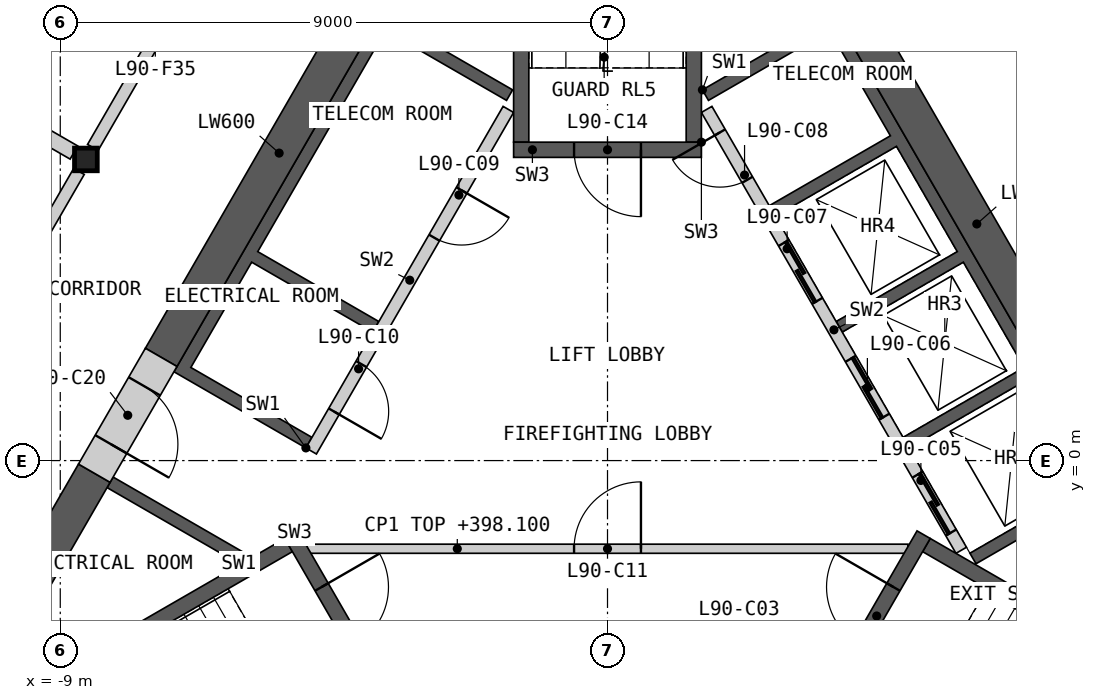
"""IFC4 building model, lengths in metres.
Left out: names, types, materials, properties, quantities, classifications, styles, units other than length and angle.
Written with IfcOpenShell. Run it as: python <this file> out.ifc"""

import sys

from ifc_helpers import new_model, si_unit, direction, frame, frame_2d, origin, origin_2d, place, context, subcontext, project, spatial, polyline, rectangle, i_section, outline, extrude, element, fill, save


model = new_model("IFC4")
c1 = context("Model", 3, precision=1e-05, world=origin(), true_north=direction((0.0, 1.0)))
c2 = subcontext(c1, "Body", "Model", "MODEL_VIEW")
j1 = project(units=[si_unit("LENGTHUNIT", "METRE"), si_unit("PLANEANGLEUNIT", "RADIAN")], contexts=[c1])
p1 = place(None, origin())
s1 = spatial("IfcSite", under=j1, at=p1, CompositionType="ELEMENT")
p2 = place(p1, origin())
s2 = spatial("IfcBuilding", under=s1, at=p2, CompositionType="ELEMENT")
p3 = place(p2, frame((0.0, 0.0, 395.0)))
s3 = spatial("IfcBuildingStorey", under=s2, at=p3, CompositionType="ELEMENT", Elevation=395.0)
p4 = place(p3, frame((-8.578, 4.953, 0.0), z_axis=(0.0, 0.0, 1.0), x_axis=(1.0, 0.0, 0.0)))
e1 = element("IfcColumn", 1, at=p4, inside=s3, PredefinedType="COLUMN", context=c2, shape_type="SweptSolid", body=[
    extrude(i_section(OverallWidth=0.374, OverallDepth=0.372, WebThickness=0.016, FlangeThickness=0.026, at=origin_2d()), origin(), (0.0, 0.0, 1.0), 3.4),
])
p5 = place(p3, origin())
e2 = element("IfcWall", 2, at=p5, inside=s3, PredefinedType="SHEAR", context=c2, shape_type="SweptSolid", body=[
    extrude(outline(polyline([(1.561, 6.097), (3.731, 7.35), (8.231, -0.444), (6.061, -1.697), (5.96, -1.524), (7.952, -0.374), (6.952, 1.358), (4.96, 0.208), (4.861, 0.381), (6.852, 1.531), (5.852, 3.263), (3.861, 2.113), (3.76, 2.287), (5.752, 3.437), (4.752, 5.169), (2.76, 4.019), (2.66, 4.192), (4.652, 5.342), (3.652, 7.074), (1.66, 5.924), (1.561, 6.097)])), origin(), (0.0, 0.0, 1.0), 3.1),
])
p6 = place(p3, frame((5.817, -1.476, 0.0), z_axis=(0.0, 0.0, 1.0), x_axis=(-0.500002616675, 0.866023893041, 0.0)))
e3 = element("IfcWall", 3, at=p6, inside=s3, PredefinedType="SOLIDWALL", context=c2, shape_type="SweptSolid", body=[
    extrude(rectangle(XDim=8.373, YDim=0.2, at=frame_2d((4.187, 0.0))), origin(), (0.0, 0.0, 1.0), 3.1),
])
p7 = place(p6, frame((0.337, 0.0, 0.0)))
e4 = element("IfcOpeningElement", 4, at=p7, cuts=e3, PredefinedType="OPENING", context=c2, shape_type="SweptSolid", body=[
    extrude(rectangle(XDim=1.1, YDim=2.1, at=frame_2d((0.55, 1.05))), frame((0.0, 0.11, 0.0), z_axis=(0.0, -1.0, 0.0), x_axis=(1.0, 0.0, 0.0)), (0.0, 0.0, 1.0), 0.22),
])
p8 = place(p6, frame((2.537, 0.0, 0.0)))
e5 = element("IfcOpeningElement", 5, at=p8, cuts=e3, PredefinedType="OPENING", context=c2, shape_type="SweptSolid", body=[
    extrude(rectangle(XDim=1.1, YDim=2.1, at=frame_2d((0.55, 1.05))), frame((0.0, 0.11, 0.0), z_axis=(0.0, -1.0, 0.0), x_axis=(1.0, 0.0, 0.0)), (0.0, 0.0, 1.0), 0.22),
])
p9 = place(p6, frame((4.737, 0.0, 0.0)))
e6 = element("IfcOpeningElement", 6, at=p9, cuts=e3, PredefinedType="OPENING", context=c2, shape_type="SweptSolid", body=[
    extrude(rectangle(XDim=1.1, YDim=2.1, at=frame_2d((0.55, 1.05))), frame((0.0, 0.11, 0.0), z_axis=(0.0, -1.0, 0.0), x_axis=(1.0, 0.0, 0.0)), (0.0, 0.0, 1.0), 0.22),
])
p10 = place(p6, frame((7.037, 0.0, 0.0)))
e7 = element("IfcOpeningElement", 7, at=p10, cuts=e3, PredefinedType="OPENING", context=c2, shape_type="SweptSolid", body=[
    extrude(rectangle(XDim=0.9, YDim=2.1, at=frame_2d((0.45, 1.05))), frame((0.0, 0.11, 0.0), z_axis=(0.0, -1.0, 0.0), x_axis=(1.0, 0.0, 0.0)), (0.0, 0.0, 1.0), 0.22),
])
p11 = place(p3, origin())
e8 = element("IfcWall", 8, at=p11, inside=s3, PredefinedType="SHEAR", context=c2, shape_type="SweptSolid", body=[
    extrude(outline(polyline([(-6.061, -1.697), (-8.231, -0.444), (-8.131, -0.271), (-5.96, -1.524), (-6.061, -1.697)])), origin(), (0.0, 0.0, 1.0), 3.1),
])
p12 = place(p3, origin())
e9 = element("IfcWall", 9, at=p12, inside=s3, PredefinedType="SHEAR", context=c2, shape_type="SweptSolid", body=[
    extrude(outline(polyline([(-4.96, 0.208), (-7.131, 1.461), (-3.731, 7.35), (-1.561, 6.097), (-1.66, 5.924), (-3.652, 7.074), (-5.752, 3.437), (-3.76, 2.287), (-3.861, 2.113), (-5.852, 3.263), (-6.852, 1.531), (-4.861, 0.381), (-4.96, 0.208)])), origin(), (0.0, 0.0, 1.0), 3.1),
])
p13 = place(p3, frame((-1.631, 5.776, 0.0), z_axis=(0.0, 0.0, 1.0), x_axis=(-0.499992876559, -0.866029516466, 0.0)))
e10 = element("IfcWall", 10, at=p13, inside=s3, PredefinedType="SOLIDWALL", context=c2, shape_type="SweptSolid", body=[
    extrude(rectangle(XDim=6.486, YDim=0.2, at=frame_2d((3.243, 0.0))), origin(), (0.0, 0.0, 1.0), 3.1),
])
p14 = place(p13, frame((1.537, 0.0, 0.0)))
e11 = element("IfcOpeningElement", 11, at=p14, cuts=e10, PredefinedType="OPENING", context=c2, shape_type="SweptSolid", body=[
    extrude(rectangle(XDim=0.9, YDim=2.1, at=frame_2d((0.45, 1.05))), frame((0.0, 0.11, 0.0), z_axis=(0.0, -1.0, 0.0), x_axis=(1.0, 0.0, 0.0)), (0.0, 0.0, 1.0), 0.22),
])
p15 = place(p13, frame((4.837, 0.0, 0.0)))
e12 = element("IfcOpeningElement", 12, at=p15, cuts=e10, PredefinedType="OPENING", context=c2, shape_type="SweptSolid", body=[
    extrude(rectangle(XDim=0.9, YDim=2.1, at=frame_2d((0.45, 1.05))), frame((0.0, 0.11, 0.0), z_axis=(0.0, -1.0, 0.0), x_axis=(1.0, 0.0, 0.0)), (0.0, 0.0, 1.0), 0.22),
])
p16 = place(p3, frame((-4.941, -1.45, 0.0), z_axis=(0.0, 0.0, 1.0), x_axis=(1.0, 0.0, 0.0)))
e13 = element("IfcWall", 13, at=p16, inside=s3, PredefinedType="PARTITIONING", context=c2, shape_type="SweptSolid", body=[
    extrude(rectangle(XDim=9.882, YDim=0.15, at=frame_2d((4.941, 0.0))), origin(), (0.0, 0.0, 1.0), 3.1),
])
p17 = place(p16, frame((4.391, 0.0, 0.0)))
e14 = element("IfcOpeningElement", 14, at=p17, cuts=e13, PredefinedType="OPENING", context=c2, shape_type="SweptSolid", body=[
    extrude(rectangle(XDim=1.1, YDim=2.1, at=frame_2d((0.55, 1.05))), frame((0.0, 0.085, 0.0), z_axis=(0.0, -1.0, 0.0), x_axis=(1.0, 0.0, 0.0)), (0.0, 0.0, 1.0), 0.17),
])
p18 = place(p3, origin())
e15 = element("IfcWall", 15, at=p18, inside=s3, PredefinedType="SHEAR", context=c2, shape_type="SweptSolid", body=[
    extrude(outline(polyline([(-5.307, -1.281), (-10.374, -4.206), (-10.032, -4.298), (-5.182, -1.498), (-5.307, -1.281)])), origin(), (0.0, 0.0, 1.0), 3.1),
])
p19 = place(p3, frame((-5.199, -1.219, 0.0), z_axis=(0.0, 0.0, 1.0), x_axis=(0.499982516597, -0.866035497597, 0.0)))
e16 = element("IfcWall", 16, at=p19, inside=s3, PredefinedType="SHEAR", context=c2, shape_type="SweptSolid", body=[
    extrude(rectangle(XDim=3.088, YDim=0.25, at=frame_2d((1.544, 0.0))), origin(), (0.0, 0.0, 1.0), 3.1),
])
p20 = place(p19, frame((0.994, 0.0, 0.0)))
e17 = element("IfcOpeningElement", 17, at=p20, cuts=e16, PredefinedType="OPENING", context=c2, shape_type="SweptSolid", body=[
    extrude(rectangle(XDim=1.1, YDim=2.1, at=frame_2d((0.55, 1.05))), frame((0.0, 0.135, 0.0), z_axis=(0.0, -1.0, 0.0), x_axis=(1.0, 0.0, 0.0)), (0.0, 0.0, 1.0), 0.27),
])
p21 = place(p3, origin())
e18 = element("IfcWall", 18, at=p21, inside=s3, PredefinedType="SHEAR", context=c2, shape_type="SweptSolid", body=[
    extrude(outline(polyline([(10.032, -4.298), (10.374, -4.206), (5.307, -1.281), (5.182, -1.498), (10.032, -4.298)])), origin(), (0.0, 0.0, 1.0), 3.1),
])
p22 = place(p3, frame((3.655, -3.893, 0.0), z_axis=(0.0, 0.0, 1.0), x_axis=(0.499982516597, 0.866035497597, 0.0)))
e19 = element("IfcWall", 19, at=p22, inside=s3, PredefinedType="SHEAR", context=c2, shape_type="SweptSolid", body=[
    extrude(rectangle(XDim=3.088, YDim=0.25, at=frame_2d((1.544, 0.0))), origin(), (0.0, 0.0, 1.0), 3.1),
])
p23 = place(p22, frame((0.994, 0.0, 0.0)))
e20 = element("IfcOpeningElement", 20, at=p23, cuts=e19, PredefinedType="OPENING", context=c2, shape_type="SweptSolid", body=[
    extrude(rectangle(XDim=1.1, YDim=2.1, at=frame_2d((0.55, 1.05))), frame((0.0, 0.135, 0.0), z_axis=(0.0, -1.0, 0.0), x_axis=(1.0, 0.0, 0.0)), (0.0, 0.0, 1.0), 0.27),
])
p24 = place(p3, origin())
e21 = element("IfcWall", 21, at=p24, inside=s3, PredefinedType="SHEAR", context=c2, shape_type="SweptSolid", body=[
    extrude(outline(polyline([(1.544, 5.237), (1.544, 11.087), (1.294, 10.837), (1.294, 5.237), (1.544, 5.237)])), origin(), (0.0, 0.0, 1.0), 3.1),
])
p25 = place(p3, origin())
e22 = element("IfcWall", 22, at=p25, inside=s3, PredefinedType="SHEAR", context=c2, shape_type="SweptSolid", body=[
    extrude(outline(polyline([(-1.294, 10.837), (-1.544, 11.087), (-1.544, 5.237), (-1.294, 5.237), (-1.294, 10.837)])), origin(), (0.0, 0.0, 1.0), 3.1),
])
p26 = place(p3, frame((1.544, 5.112, 0.0), z_axis=(0.0, 0.0, 1.0), x_axis=(-1.0, 0.0, 0.0)))
e23 = element("IfcWall", 23, at=p26, inside=s3, PredefinedType="SHEAR", context=c2, shape_type="SweptSolid", body=[
    extrude(rectangle(XDim=3.088, YDim=0.25, at=frame_2d((1.544, 0.0))), origin(), (0.0, 0.0, 1.0), 3.1),
])
p27 = place(p26, frame((0.994, 0.0, 0.0)))
e24 = element("IfcOpeningElement", 24, at=p27, cuts=e23, PredefinedType="OPENING", context=c2, shape_type="SweptSolid", body=[
    extrude(rectangle(XDim=1.1, YDim=2.1, at=frame_2d((0.55, 1.05))), frame((0.0, 0.135, 0.0), z_axis=(0.0, -1.0, 0.0), x_axis=(1.0, 0.0, 0.0)), (0.0, 0.0, 1.0), 0.27),
])
p28 = place(p3, frame((8.686, -0.634, 0.0), z_axis=(0.0, 0.0, 1.0), x_axis=(-0.50001836461, 0.866014800712, 0.0)))
e25 = element("IfcWall", 25, at=p28, inside=s3, PredefinedType="SHEAR", context=c2, shape_type="SweptSolid", body=[
    extrude(rectangle(XDim=10.451, YDim=0.6, at=frame_2d((5.225, 0.0))), origin(), (0.0, 0.0, 1.0), 3.1),
])
p29 = place(p3, frame((-3.461, 8.417, 0.0), z_axis=(0.0, 0.0, 1.0), x_axis=(-0.50000391502, -0.866023143435, 0.0)))
e26 = element("IfcWall", 26, at=p29, inside=s3, PredefinedType="SHEAR", context=c2, shape_type="SweptSolid", body=[
    extrude(rectangle(XDim=7.759, YDim=0.6, at=frame_2d((3.879, 0.0))), origin(), (0.0, 0.0, 1.0), 3.1),
])
p30 = place(p3, frame((-8.44, -0.208, 0.0), z_axis=(0.0, 0.0, 1.0), x_axis=(-0.500007425856, -0.866021116422, 0.0)))
e27 = element("IfcWall", 27, at=p30, inside=s3, PredefinedType="SHEAR", context=c2, shape_type="SweptSolid", body=[
    extrude(rectangle(XDim=4.969, YDim=0.6, at=frame_2d((2.484, 0.0))), origin(), (0.0, 0.0, 1.0), 3.1),
])
p31 = place(p3, frame((-7.34, 1.698, 0.0), z_axis=(0.0, 0.0, 1.0), x_axis=(-0.50002983664, -0.866008176907, 0.0)))
e28 = element("IfcWall", 28, at=p31, inside=s3, PredefinedType="SHEAR", context=c2, shape_type="SweptSolid", body=[
    extrude(rectangle(XDim=2.2, YDim=0.6, at=frame_2d((1.1, 0.0))), origin(), (0.0, 0.0, 1.0), 3.1),
])
p32 = place(p31, frame((0.55, 0.0, 0.0)))
e29 = element("IfcOpeningElement", 29, at=p32, cuts=e28, PredefinedType="OPENING", context=c2, shape_type="SweptSolid", body=[
    extrude(rectangle(XDim=1.1, YDim=2.1, at=frame_2d((0.55, 1.05))), frame((0.0, 0.31, 0.0), z_axis=(0.0, -1.0, 0.0), x_axis=(1.0, 0.0, 0.0)), (0.0, 0.0, 1.0), 0.62),
])
p33 = place(p3, frame((4.403, 12.185, 0.0), z_axis=(0.0, 0.0, 1.0), x_axis=(0.499992155518, -0.866029932751, 0.0)))
e30 = element("IfcWall", 30, at=p33, inside=s3, PredefinedType="PARTITIONING", context=c2, shape_type="SweptSolid", body=[
    extrude(rectangle(XDim=8.123, YDim=0.2, at=frame_2d((4.062, 0.0))), origin(), (0.0, 0.0, 1.0), 3.1),
])
p34 = place(p33, frame((3.762, 0.0, 0.0)))
e31 = element("IfcOpeningElement", 31, at=p34, cuts=e30, PredefinedType="OPENING", context=c2, shape_type="SweptSolid", body=[
    extrude(rectangle(XDim=1.0, YDim=2.1, at=frame_2d((0.5, 1.05))), frame((0.0, 0.11, 0.0), z_axis=(0.0, -1.0, 0.0), x_axis=(1.0, 0.0, 0.0)), (0.0, 0.0, 1.0), 0.22),
])
p35 = place(p3, frame((-8.465, 5.15, 0.0), z_axis=(0.0, 0.0, 1.0), x_axis=(0.499992155518, 0.866029932751, 0.0)))
e32 = element("IfcWall", 32, at=p35, inside=s3, PredefinedType="PARTITIONING", context=c2, shape_type="SweptSolid", body=[
    extrude(rectangle(XDim=8.123, YDim=0.2, at=frame_2d((4.062, 0.0))), origin(), (0.0, 0.0, 1.0), 3.1),
])
p36 = place(p35, frame((1.956, 0.0, 0.0)))
e33 = element("IfcOpeningElement", 33, at=p36, cuts=e32, PredefinedType="OPENING", context=c2, shape_type="SweptSolid", body=[
    extrude(rectangle(XDim=1.0, YDim=2.1, at=frame_2d((0.5, 1.05))), frame((0.0, 0.11, 0.0), z_axis=(0.0, -1.0, 0.0), x_axis=(1.0, 0.0, 0.0)), (0.0, 0.0, 1.0), 0.22),
])
p37 = place(p3, frame((-12.754, -2.279, 0.0), z_axis=(0.0, 0.0, 1.0), x_axis=(0.500001682468, 0.866024432409, 0.0)))
e34 = element("IfcWall", 34, at=p37, inside=s3, PredefinedType="PARTITIONING", context=c2, shape_type="SweptSolid", body=[
    extrude(rectangle(XDim=8.124, YDim=0.2, at=frame_2d((4.062, 0.0))), origin(), (0.0, 0.0, 1.0), 3.1),
])
p38 = place(p37, frame((3.762, 0.0, 0.0)))
e35 = element("IfcOpeningElement", 35, at=p38, cuts=e34, PredefinedType="OPENING", context=c2, shape_type="SweptSolid", body=[
    extrude(rectangle(XDim=1.0, YDim=2.1, at=frame_2d((0.5, 1.05))), frame((0.0, 0.11, 0.0), z_axis=(0.0, -1.0, 0.0), x_axis=(1.0, 0.0, 0.0)), (0.0, 0.0, 1.0), 0.22),
])
p39 = place(p3, frame((-10.873, 6.278, 0.0), z_axis=(0.0, 0.0, 1.0), x_axis=(0.865989219354, -0.500062668036, 0.0)))
e36 = element("IfcWall", 36, at=p39, inside=s3, PredefinedType="PARTITIONING", context=c2, shape_type="SweptSolid", body=[
    extrude(rectangle(XDim=2.423, YDim=0.25, at=frame_2d((1.211, 0.0))), origin(), (0.0, 0.0, 1.0), 2.33),
])
p40 = place(p7, origin())
e37 = element("IfcDoor", 37, at=p40, inside=s3, OperationType="SLIDING_TO_LEFT", PredefinedType="DOOR", context=c2, shape_type="SweptSolid", body=[
    extrude(rectangle(XDim=1.1, YDim=2.1, at=frame_2d((0.55, 1.05))), frame((0.0, 0.025, 0.0), z_axis=(0.0, -1.0, 0.0), x_axis=(1.0, 0.0, 0.0)), (0.0, 0.0, 1.0), 0.05),
])
fill(e4, e37)
p41 = place(p8, origin())
e38 = element("IfcDoor", 38, at=p41, inside=s3, OperationType="SLIDING_TO_LEFT", PredefinedType="DOOR", context=c2, shape_type="SweptSolid", body=[
    extrude(rectangle(XDim=1.1, YDim=2.1, at=frame_2d((0.55, 1.05))), frame((0.0, 0.025, 0.0), z_axis=(0.0, -1.0, 0.0), x_axis=(1.0, 0.0, 0.0)), (0.0, 0.0, 1.0), 0.05),
])
fill(e5, e38)
p42 = place(p9, origin())
e39 = element("IfcDoor", 39, at=p42, inside=s3, OperationType="SLIDING_TO_LEFT", PredefinedType="DOOR", context=c2, shape_type="SweptSolid", body=[
    extrude(rectangle(XDim=1.1, YDim=2.1, at=frame_2d((0.55, 1.05))), frame((0.0, 0.025, 0.0), z_axis=(0.0, -1.0, 0.0), x_axis=(1.0, 0.0, 0.0)), (0.0, 0.0, 1.0), 0.05),
])
fill(e6, e39)
p43 = place(p10, origin())
e40 = element("IfcDoor", 40, at=p43, inside=s3, OperationType="SINGLE_SWING_RIGHT", PredefinedType="DOOR", context=c2, shape_type="SweptSolid", body=[
    extrude(rectangle(XDim=0.9, YDim=2.1, at=frame_2d((0.45, 1.05))), frame((0.0, 0.025, 0.0), z_axis=(0.0, -1.0, 0.0), x_axis=(1.0, 0.0, 0.0)), (0.0, 0.0, 1.0), 0.05),
])
fill(e7, e40)
p44 = place(p14, origin())
e41 = element("IfcDoor", 41, at=p44, inside=s3, OperationType="SINGLE_SWING_LEFT", PredefinedType="DOOR", context=c2, shape_type="SweptSolid", body=[
    extrude(rectangle(XDim=0.9, YDim=2.1, at=frame_2d((0.45, 1.05))), frame((0.0, 0.025, 0.0), z_axis=(0.0, -1.0, 0.0), x_axis=(1.0, 0.0, 0.0)), (0.0, 0.0, 1.0), 0.05),
])
fill(e11, e41)
p45 = place(p15, origin())
e42 = element("IfcDoor", 42, at=p45, inside=s3, OperationType="SINGLE_SWING_RIGHT", PredefinedType="DOOR", context=c2, shape_type="SweptSolid", body=[
    extrude(rectangle(XDim=0.9, YDim=2.1, at=frame_2d((0.45, 1.05))), frame((0.0, 0.025, 0.0), z_axis=(0.0, -1.0, 0.0), x_axis=(1.0, 0.0, 0.0)), (0.0, 0.0, 1.0), 0.05),
])
fill(e12, e42)
p46 = place(p17, origin())
e43 = element("IfcDoor", 43, at=p46, inside=s3, OperationType="SINGLE_SWING_RIGHT", PredefinedType="DOOR", context=c2, shape_type="SweptSolid", body=[
    extrude(rectangle(XDim=1.1, YDim=2.1, at=frame_2d((0.55, 1.05))), frame((0.0, 0.025, 0.0), z_axis=(0.0, -1.0, 0.0), x_axis=(1.0, 0.0, 0.0)), (0.0, 0.0, 1.0), 0.05),
])
fill(e14, e43)
p47 = place(p20, origin())
e44 = element("IfcDoor", 44, at=p47, inside=s3, OperationType="SINGLE_SWING_LEFT", PredefinedType="DOOR", context=c2, shape_type="SweptSolid", body=[
    extrude(rectangle(XDim=1.1, YDim=2.1, at=frame_2d((0.55, 1.05))), frame((0.0, 0.025, 0.0), z_axis=(0.0, -1.0, 0.0), x_axis=(1.0, 0.0, 0.0)), (0.0, 0.0, 1.0), 0.05),
])
fill(e17, e44)
p48 = place(p23, origin())
e45 = element("IfcDoor", 45, at=p48, inside=s3, OperationType="SINGLE_SWING_RIGHT", PredefinedType="DOOR", context=c2, shape_type="SweptSolid", body=[
    extrude(rectangle(XDim=1.1, YDim=2.1, at=frame_2d((0.55, 1.05))), frame((0.0, 0.025, 0.0), z_axis=(0.0, -1.0, 0.0), x_axis=(1.0, 0.0, 0.0)), (0.0, 0.0, 1.0), 0.05),
])
fill(e20, e45)
p49 = place(p27, origin())
e46 = element("IfcDoor", 46, at=p49, inside=s3, OperationType="SINGLE_SWING_LEFT", PredefinedType="DOOR", context=c2, shape_type="SweptSolid", body=[
    extrude(rectangle(XDim=1.1, YDim=2.1, at=frame_2d((0.55, 1.05))), frame((0.0, 0.025, 0.0), z_axis=(0.0, -1.0, 0.0), x_axis=(1.0, 0.0, 0.0)), (0.0, 0.0, 1.0), 0.05),
])
fill(e24, e46)
p50 = place(p32, origin())
e47 = element("IfcDoor", 47, at=p50, inside=s3, OperationType="SINGLE_SWING_RIGHT", PredefinedType="DOOR", context=c2, shape_type="SweptSolid", body=[
    extrude(rectangle(XDim=1.1, YDim=2.1, at=frame_2d((0.55, 1.05))), frame((0.0, 0.055, 0.0), z_axis=(0.0, -1.0, 0.0), x_axis=(1.0, 0.0, 0.0)), (0.0, 0.0, 1.0), 0.05),
])
fill(e29, e47)
save(model, sys.argv[1])
